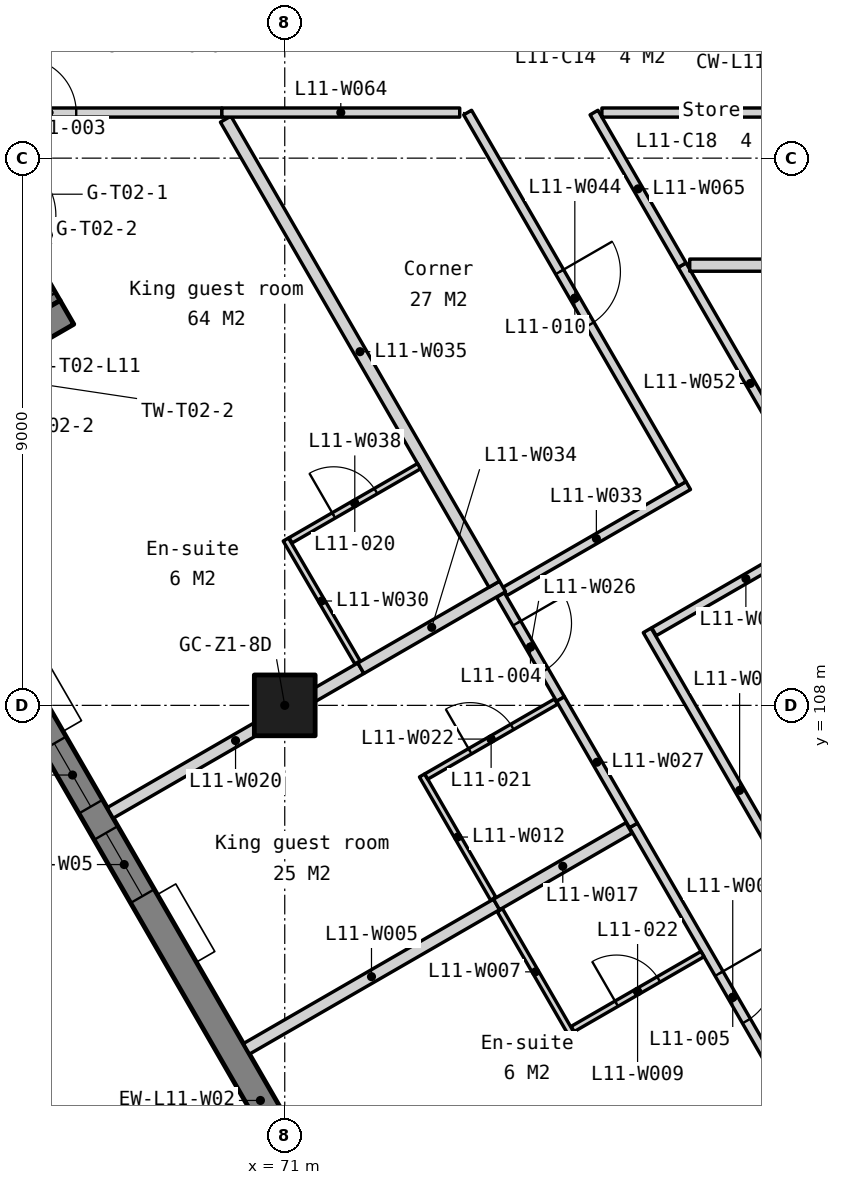
"""IFC4 building model, lengths in metres.
Left out: names, types, materials, properties, quantities, classifications, styles, units other than length and angle.
Written with IfcOpenShell. Run it as: python <this file> out.ifc"""

import sys

from ifc_helpers import new_model, si_unit, direction, frame, frame_2d, origin, origin_2d, place, context, subcontext, project, spatial, polyline, rectangle, outline, extrude, element, fill, save


model = new_model("IFC4")
c1 = context("Model", 3, precision=1e-05, world=origin(), true_north=direction((0.0, 1.0)))
c2 = subcontext(c1, "Body", "Model", "MODEL_VIEW")
j1 = project(units=[si_unit("LENGTHUNIT", "METRE"), si_unit("PLANEANGLEUNIT", "RADIAN")], contexts=[c1])
p1 = place(None, origin())
s1 = spatial("IfcSite", under=j1, at=p1, CompositionType="ELEMENT")
p2 = place(p1, origin())
s2 = spatial("IfcBuilding", under=s1, at=p2, CompositionType="ELEMENT")
p3 = place(p2, frame((0.0, 0.0, 52.5)))
s3 = spatial("IfcBuildingStorey", under=s2, at=p3, CompositionType="ELEMENT", Elevation=52.5)
p4 = place(p3, frame((71.0, 108.0, 0.0), z_axis=(0.0, 0.0, 1.0), x_axis=(1.0, 0.0, 0.0)))
e1 = element("IfcColumn", 1, at=p4, inside=s3, PredefinedType="COLUMN", context=c2, shape_type="SweptSolid", body=[
    extrude(rectangle(XDim=1.0, YDim=1.0, at=origin_2d()), origin(), (0.0, 0.0, 1.0), 3.5),
])
p5 = place(p3, frame((64.305, 112.405, -0.15), z_axis=(0.0, 0.0, 1.0), x_axis=(0.499997464327, -0.866026867751, 0.0)))
e2 = element("IfcWall", 2, at=p5, inside=s3, PredefinedType="SOLIDWALL", context=c2, shape_type="SweptSolid", body=[
    extrude(outline(polyline([(25.18, 3.5), (25.18, 0.0), (0.0, 0.0), (0.0, 3.5), (25.18, 3.5)])), frame((0.0, 0.225, 0.0), z_axis=(0.0, -1.0, 0.0), x_axis=(1.0, 0.0, 0.0)), (0.0, 0.0, 1.0), 0.45),
])
p6 = place(p5, frame((5.81, 0.0, 1.05)))
e3 = element("IfcOpeningElement", 3, at=p6, cuts=e2, PredefinedType="OPENING", context=c2, shape_type="SweptSolid", body=[
    extrude(rectangle(XDim=1.2, YDim=1.5, at=frame_2d((0.6, 0.75))), frame((0.0, 0.235, 0.0), z_axis=(0.0, -1.0, 0.0), x_axis=(1.0, 0.0, 0.0)), (0.0, 0.0, 1.0), 0.47),
])
p7 = place(p5, frame((7.51, 0.0, 1.05)))
e4 = element("IfcOpeningElement", 4, at=p7, cuts=e2, PredefinedType="OPENING", context=c2, shape_type="SweptSolid", body=[
    extrude(rectangle(XDim=1.2, YDim=1.5, at=frame_2d((0.6, 0.75))), frame((0.0, 0.235, 0.0), z_axis=(0.0, -1.0, 0.0), x_axis=(1.0, 0.0, 0.0)), (0.0, 0.0, 1.0), 0.47),
])
p8 = place(p5, frame((14.77, 0.0, 1.05)))
e5 = element("IfcOpeningElement", 5, at=p8, cuts=e2, PredefinedType="OPENING", context=c2, shape_type="SweptSolid", body=[
    extrude(rectangle(XDim=1.2, YDim=1.5, at=frame_2d((0.6, 0.75))), frame((0.0, 0.235, 0.0), z_axis=(0.0, -1.0, 0.0), x_axis=(1.0, 0.0, 0.0)), (0.0, 0.0, 1.0), 0.47),
])
p9 = place(p5, frame((16.47, 0.0, 1.05)))
e6 = element("IfcOpeningElement", 6, at=p9, cuts=e2, PredefinedType="OPENING", context=c2, shape_type="SweptSolid", body=[
    extrude(rectangle(XDim=1.2, YDim=1.5, at=frame_2d((0.6, 0.75))), frame((0.0, 0.235, 0.0), z_axis=(0.0, -1.0, 0.0), x_axis=(1.0, 0.0, 0.0)), (0.0, 0.0, 1.0), 0.47),
])
p10 = place(p5, frame((23.258, 0.0, 1.05)))
e7 = element("IfcOpeningElement", 7, at=p10, cuts=e2, PredefinedType="OPENING", context=c2, shape_type="SweptSolid", body=[
    extrude(rectangle(XDim=1.2, YDim=1.5, at=frame_2d((0.6, 0.75))), frame((0.0, 0.235, 0.0), z_axis=(0.0, -1.0, 0.0), x_axis=(1.0, 0.0, 0.0)), (0.0, 0.0, 1.0), 0.47),
])
p11 = place(p3, frame((63.998, 112.488, 0.0), z_axis=(0.0, 0.0, 1.0), x_axis=(0.866005453737, 0.500034552904, 0.0)))
e8 = element("IfcWall", 8, at=p11, inside=s3, PredefinedType="SOLIDWALL", context=c2, shape_type="SweptSolid", body=[
    extrude(rectangle(XDim=3.95, YDim=0.45, at=frame_2d((1.975, 0.0))), origin(), (0.0, 0.0, 1.0), 6.85),
])
p12 = place(p3, frame((65.861, 116.71, -0.15), z_axis=(0.0, 0.0, 1.0), x_axis=(0.499961950354, -0.866047370643, 0.0)))
e9 = element("IfcWall", 9, at=p12, inside=s3, PredefinedType="SOLIDWALL", context=c2, shape_type="SweptSolid", body=[
    extrude(rectangle(XDim=2.5, YDim=0.45, at=frame_2d((1.25, 0.0))), origin(), (0.0, 0.0, 1.0), 3.5),
])
p13 = place(p12, frame((0.75, 0.0, 0.15)))
e10 = element("IfcOpeningElement", 10, at=p13, cuts=e9, PredefinedType="OPENING", context=c2, shape_type="SweptSolid", body=[
    extrude(rectangle(XDim=1.0, YDim=2.4, at=frame_2d((0.5, 1.2))), frame((0.0, 0.235, 0.0), z_axis=(0.0, -1.0, 0.0), x_axis=(1.0, 0.0, 0.0)), (0.0, 0.0, 1.0), 0.47),
])
p14 = place(p12, frame((0.15, 0.0, 0.15)))
e11 = element("IfcOpeningElement", 11, at=p14, cuts=e9, PredefinedType="OPENING", context=c2, shape_type="SweptSolid", body=[
    extrude(rectangle(XDim=0.4, YDim=2.4, at=frame_2d((0.2, 1.2))), frame((0.0, 0.235, 0.0), z_axis=(0.0, -1.0, 0.0), x_axis=(1.0, 0.0, 0.0)), (0.0, 0.0, 1.0), 0.47),
])
p15 = place(p12, frame((1.95, 0.0, 0.15)))
e12 = element("IfcOpeningElement", 12, at=p15, cuts=e9, PredefinedType="OPENING", context=c2, shape_type="SweptSolid", body=[
    extrude(rectangle(XDim=0.4, YDim=2.4, at=frame_2d((0.2, 1.2))), frame((0.0, 0.235, 0.0), z_axis=(0.0, -1.0, 0.0), x_axis=(1.0, 0.0, 0.0)), (0.0, 0.0, 1.0), 0.47),
])
p16 = place(p3, frame((76.735, 106.026, 0.0), z_axis=(0.0, 0.0, 1.0), x_axis=(0.499995393218, -0.866028063495, 0.0)))
e13 = element("IfcWall", 13, at=p16, inside=s3, PredefinedType="PARTITIONING", context=c2, shape_type="SweptSolid", body=[
    extrude(rectangle(XDim=6.53, YDim=0.15, at=frame_2d((3.265, 0.0))), origin(), (0.0, 0.0, 1.0), 3.35),
])
p17 = place(p16, frame((2.815, 0.0, 0.0)))
e14 = element("IfcOpeningElement", 14, at=p17, cuts=e13, PredefinedType="OPENING", context=c2, shape_type="SweptSolid", body=[
    extrude(rectangle(XDim=0.9, YDim=2.1, at=frame_2d((0.45, 1.05))), frame((0.0, 0.085, 0.0), z_axis=(0.0, -1.0, 0.0), x_axis=(1.0, 0.0, 0.0)), (0.0, 0.0, 1.0), 0.17),
])
p18 = place(p3, frame((70.37, 102.351, 0.0), z_axis=(0.0, 0.0, 1.0), x_axis=(0.866033238375, 0.499986429846, 0.0)))
e15 = element("IfcWall", 15, at=p18, inside=s3, PredefinedType="PARTITIONING", context=c2, shape_type="SweptSolid", body=[
    extrude(rectangle(XDim=4.75, YDim=0.2, at=frame_2d((2.375, 0.0))), origin(), (0.0, 0.0, 1.0), 3.35),
])
p19 = place(p3, frame((74.538, 104.63, 0.0), z_axis=(0.0, 0.0, 1.0), x_axis=(0.499999433879, -0.866025730634, 0.0)))
e16 = element("IfcWall", 16, at=p19, inside=s3, PredefinedType="PARTITIONING", context=c2, shape_type="SweptSolid", body=[
    extrude(rectangle(XDim=2.34, YDim=0.1, at=frame_2d((1.17, 0.0))), origin(), (0.0, 0.0, 1.0), 3.35),
])
p20 = place(p3, frame((75.735, 102.677, 0.0), z_axis=(0.0, 0.0, 1.0), x_axis=(0.866040446274, 0.499973944738, 0.0)))
e17 = element("IfcWall", 17, at=p20, inside=s3, PredefinedType="PARTITIONING", context=c2, shape_type="SweptSolid", body=[
    extrude(rectangle(XDim=2.465, YDim=0.1, at=frame_2d((1.232, 0.0))), origin(), (0.0, 0.0, 1.0), 3.35),
])
p21 = place(p20, frame((0.833, 0.0, 0.0)))
e18 = element("IfcOpeningElement", 18, at=p21, cuts=e17, PredefinedType="OPENING", context=c2, shape_type="SweptSolid", body=[
    extrude(rectangle(XDim=0.8, YDim=2.1, at=frame_2d((0.4, 1.05))), frame((0.0, 0.06, 0.0), z_axis=(0.0, -1.0, 0.0), x_axis=(1.0, 0.0, 0.0)), (0.0, 0.0, 1.0), 0.12),
])
p22 = place(p3, frame((73.258, 106.847, 0.0), z_axis=(0.0, 0.0, 1.0), x_axis=(0.499999433879, -0.866025730634, 0.0)))
e19 = element("IfcWall", 19, at=p22, inside=s3, PredefinedType="PARTITIONING", context=c2, shape_type="SweptSolid", body=[
    extrude(rectangle(XDim=2.34, YDim=0.1, at=frame_2d((1.17, 0.0))), origin(), (0.0, 0.0, 1.0), 3.35),
])
p23 = place(p3, frame((74.483, 104.726, 0.0), z_axis=(0.0, 0.0, 1.0), x_axis=(0.866006140796, 0.500033362991, 0.0)))
e20 = element("IfcWall", 20, at=p23, inside=s3, PredefinedType="PARTITIONING", context=c2, shape_type="SweptSolid", body=[
    extrude(rectangle(XDim=2.515, YDim=0.2, at=frame_2d((1.257, 0.0))), origin(), (0.0, 0.0, 1.0), 3.35),
])
p24 = place(p3, frame((68.13, 106.23, 0.0), z_axis=(0.0, 0.0, 1.0), x_axis=(0.866037825118, 0.499978485002, 0.0)))
e21 = element("IfcWall", 21, at=p24, inside=s3, PredefinedType="PARTITIONING", context=c2, shape_type="SweptSolid", body=[
    extrude(rectangle(XDim=4.76, YDim=0.2, at=frame_2d((2.38, 0.0))), origin(), (0.0, 0.0, 1.0), 3.35),
])
p25 = place(p3, frame((73.327, 106.829, 0.0), z_axis=(0.0, 0.0, 1.0), x_axis=(0.866040446274, 0.499973944738, 0.0)))
e22 = element("IfcWall", 22, at=p25, inside=s3, PredefinedType="PARTITIONING", context=c2, shape_type="SweptSolid", body=[
    extrude(rectangle(XDim=2.465, YDim=0.1, at=frame_2d((1.232, 0.0))), origin(), (0.0, 0.0, 1.0), 3.35),
])
p26 = place(p25, frame((0.833, 0.0, 0.0)))
e23 = element("IfcOpeningElement", 23, at=p26, cuts=e22, PredefinedType="OPENING", context=c2, shape_type="SweptSolid", body=[
    extrude(rectangle(XDim=0.8, YDim=2.1, at=frame_2d((0.4, 1.05))), frame((0.0, 0.06, 0.0), z_axis=(0.0, -1.0, 0.0), x_axis=(1.0, 0.0, 0.0)), (0.0, 0.0, 1.0), 0.12),
])
p27 = place(p3, frame((74.548, 109.814, 0.0), z_axis=(0.0, 0.0, 1.0), x_axis=(0.499968599967, -0.866043531843, 0.0)))
e24 = element("IfcWall", 24, at=p27, inside=s3, PredefinedType="PARTITIONING", context=c2, shape_type="SweptSolid", body=[
    extrude(rectangle(XDim=1.975, YDim=0.15, at=frame_2d((0.987, 0.0))), origin(), (0.0, 0.0, 1.0), 3.35),
])
p28 = place(p27, frame((0.538, 0.0, 0.0)))
e25 = element("IfcOpeningElement", 25, at=p28, cuts=e24, PredefinedType="OPENING", context=c2, shape_type="SweptSolid", body=[
    extrude(rectangle(XDim=0.9, YDim=2.1, at=frame_2d((0.45, 1.05))), frame((0.0, 0.085, 0.0), z_axis=(0.0, -1.0, 0.0), x_axis=(1.0, 0.0, 0.0)), (0.0, 0.0, 1.0), 0.17),
])
p29 = place(p3, frame((75.535, 108.104, 0.0), z_axis=(0.0, 0.0, 1.0), x_axis=(0.500033551112, -0.866006032174, 0.0)))
e26 = element("IfcWall", 26, at=p29, inside=s3, PredefinedType="PARTITIONING", context=c2, shape_type="SweptSolid", body=[
    extrude(rectangle(XDim=2.4, YDim=0.15, at=frame_2d((1.2, 0.0))), origin(), (0.0, 0.0, 1.0), 3.35),
])
p30 = place(p3, frame((71.018, 110.727, 0.0), z_axis=(0.0, 0.0, 1.0), x_axis=(0.503637463939, -0.863915102841, 0.0)))
e27 = element("IfcWall", 27, at=p30, inside=s3, PredefinedType="PARTITIONING", context=c2, shape_type="SweptSolid", body=[
    extrude(rectangle(XDim=2.34, YDim=0.1, at=frame_2d((1.17, 0.0))), origin(), (0.0, 0.0, 1.0), 3.35),
])
p31 = place(p3, frame((76.961, 109.234, 0.0), z_axis=(0.0, 0.0, 1.0), x_axis=(0.499984420002, -0.866034398714, 0.0)))
e28 = element("IfcWall", 28, at=p31, inside=s3, PredefinedType="PARTITIONING", context=c2, shape_type="SweptSolid", body=[
    extrude(rectangle(XDim=6.077, YDim=0.15, at=frame_2d((3.039, 0.0))), origin(), (0.0, 0.0, 1.0), 3.35),
])
p32 = place(p3, frame((74.614, 109.87, 0.0), z_axis=(0.0, 0.0, 1.0), x_axis=(0.866043466982, 0.49996871232, 0.0)))
e29 = element("IfcWall", 29, at=p32, inside=s3, PredefinedType="PARTITIONING", context=c2, shape_type="SweptSolid", body=[
    extrude(rectangle(XDim=3.49, YDim=0.15, at=frame_2d((1.745, 0.0))), origin(), (0.0, 0.0, 1.0), 3.35),
])
p33 = place(p3, frame((72.252, 108.61, 0.0), z_axis=(0.0, 0.0, 1.0), x_axis=(0.865989100438, 0.500062873969, 0.0)))
e30 = element("IfcWall", 30, at=p33, inside=s3, PredefinedType="PARTITIONING", context=c2, shape_type="SweptSolid", body=[
    extrude(rectangle(XDim=2.69, YDim=0.2, at=frame_2d((1.345, 0.0))), origin(), (0.0, 0.0, 1.0), 3.35),
])
p34 = place(p3, frame((70.029, 117.642, 0.0), z_axis=(0.0, 0.0, 1.0), x_axis=(0.499997595687, -0.866026791911, 0.0)))
e31 = element("IfcWall", 31, at=p34, inside=s3, PredefinedType="PARTITIONING", context=c2, shape_type="SweptSolid", body=[
    extrude(rectangle(XDim=8.833, YDim=0.2, at=frame_2d((4.417, 0.0))), origin(), (0.0, 0.0, 1.0), 3.35),
])
p35 = place(p3, frame((71.095, 110.714, 0.0), z_axis=(0.0, 0.0, 1.0), x_axis=(0.866048967903, 0.499959183527, 0.0)))
e32 = element("IfcWall", 32, at=p35, inside=s3, PredefinedType="PARTITIONING", context=c2, shape_type="SweptSolid", body=[
    extrude(rectangle(XDim=2.44, YDim=0.1, at=frame_2d((1.22, 0.0))), origin(), (0.0, 0.0, 1.0), 3.35),
])
p36 = place(p35, frame((0.82, 0.0, 0.0)))
e33 = element("IfcOpeningElement", 33, at=p36, cuts=e32, PredefinedType="OPENING", context=c2, shape_type="SweptSolid", body=[
    extrude(rectangle(XDim=0.8, YDim=2.1, at=frame_2d((0.4, 1.05))), frame((0.0, 0.06, 0.0), z_axis=(0.0, -1.0, 0.0), x_axis=(1.0, 0.0, 0.0)), (0.0, 0.0, 1.0), 0.12),
])
p37 = place(p3, frame((77.073, 109.211, 0.0), z_axis=(0.0, 0.0, 1.0), x_axis=(0.866013176292, 0.50002117804, 0.0)))
e34 = element("IfcWall", 34, at=p37, inside=s3, PredefinedType="PARTITIONING", context=c2, shape_type="SweptSolid", body=[
    extrude(rectangle(XDim=3.49, YDim=0.15, at=frame_2d((1.745, 0.0))), origin(), (0.0, 0.0, 1.0), 3.35),
])
p38 = place(p3, frame((74.007, 117.75, 0.0), z_axis=(0.0, 0.0, 1.0), x_axis=(0.500026110575, -0.866010328312, 0.0)))
e35 = element("IfcWall", 35, at=p38, inside=s3, PredefinedType="PARTITIONING", context=c2, shape_type="SweptSolid", body=[
    extrude(rectangle(XDim=7.052, YDim=0.15, at=frame_2d((3.526, 0.0))), origin(), (0.0, 0.0, 1.0), 3.35),
])
p39 = place(p38, frame((3.026, 0.0, 0.0)))
e36 = element("IfcOpeningElement", 36, at=p39, cuts=e35, PredefinedType="OPENING", context=c2, shape_type="SweptSolid", body=[
    extrude(rectangle(XDim=1.0, YDim=2.1, at=frame_2d((0.5, 1.05))), frame((0.0, 0.085, 0.0), z_axis=(0.0, -1.0, 0.0), x_axis=(1.0, 0.0, 0.0)), (0.0, 0.0, 1.0), 0.17),
])
p40 = place(p3, frame((77.535, 115.24, 0.0), z_axis=(0.0, 0.0, 1.0), x_axis=(0.500043949999, -0.866000027754, 0.0)))
e37 = element("IfcWall", 37, at=p40, inside=s3, PredefinedType="PARTITIONING", context=c2, shape_type="SweptSolid", body=[
    extrude(rectangle(XDim=4.492, YDim=0.15, at=frame_2d((2.246, 0.0))), origin(), (0.0, 0.0, 1.0), 3.35),
])
p41 = place(p3, frame((77.66, 115.24, 0.0), z_axis=(0.0, 0.0, 1.0), x_axis=(1.0, 0.0, 0.0)))
e38 = element("IfcWall", 38, at=p41, inside=s3, PredefinedType="PARTITIONING", context=c2, shape_type="SweptSolid", body=[
    extrude(rectangle(XDim=8.721, YDim=0.2, at=frame_2d((4.361, 0.0))), origin(), (0.0, 0.0, 1.0), 3.35),
])
p42 = place(p3, frame((64.275, 117.75, 0.0), z_axis=(0.0, 0.0, 1.0), x_axis=(1.0, 0.0, 0.0)))
e39 = element("IfcWall", 39, at=p42, inside=s3, PredefinedType="PARTITIONING", context=c2, shape_type="SweptSolid", body=[
    extrude(rectangle(XDim=5.691, YDim=0.15, at=frame_2d((2.846, 0.0))), origin(), (0.0, 0.0, 1.0), 2.938),
])
p43 = place(p42, frame((2.396, 0.0, 0.0)))
e40 = element("IfcOpeningElement", 40, at=p43, cuts=e39, PredefinedType="OPENING", context=c2, shape_type="SweptSolid", body=[
    extrude(rectangle(XDim=0.9, YDim=2.1, at=frame_2d((0.45, 1.05))), frame((0.0, 0.085, 0.0), z_axis=(0.0, -1.0, 0.0), x_axis=(1.0, 0.0, 0.0)), (0.0, 0.0, 1.0), 0.17),
])
p44 = place(p3, frame((69.966, 117.75, 0.0), z_axis=(0.0, 0.0, 1.0), x_axis=(1.0, 0.0, 0.0)))
e41 = element("IfcWall", 41, at=p44, inside=s3, PredefinedType="PARTITIONING", context=c2, shape_type="SweptSolid", body=[
    extrude(rectangle(XDim=3.911, YDim=0.15, at=frame_2d((1.956, 0.0))), origin(), (0.0, 0.0, 1.0), 2.938),
])
p45 = place(p3, frame((76.086, 117.75, 0.0), z_axis=(0.0, 0.0, 1.0), x_axis=(0.499953366038, -0.866052326241, 0.0)))
e42 = element("IfcWall", 42, at=p45, inside=s3, PredefinedType="PARTITIONING", context=c2, shape_type="SweptSolid", body=[
    extrude(rectangle(XDim=2.898, YDim=0.15, at=frame_2d((1.449, 0.0))), origin(), (0.0, 0.0, 1.0), 3.35),
])
p46 = place(p3, frame((76.216, 117.75, 0.0), z_axis=(0.0, 0.0, 1.0), x_axis=(1.0, 0.0, 0.0)))
e43 = element("IfcWall", 43, at=p46, inside=s3, PredefinedType="PARTITIONING", context=c2, shape_type="SweptSolid", body=[
    extrude(rectangle(XDim=11.61, YDim=0.15, at=frame_2d((5.805, 0.0))), origin(), (0.0, 0.0, 1.0), 2.938),
])
p47 = place(p46, frame((5.355, 0.0, 0.0)))
e44 = element("IfcOpeningElement", 44, at=p47, cuts=e43, PredefinedType="OPENING", context=c2, shape_type="SweptSolid", body=[
    extrude(rectangle(XDim=0.9, YDim=2.1, at=frame_2d((0.45, 1.05))), frame((0.0, 0.085, 0.0), z_axis=(0.0, -1.0, 0.0), x_axis=(1.0, 0.0, 0.0)), (0.0, 0.0, 1.0), 0.17),
])
p48 = place(p6, origin())
e45 = element("IfcWindow", 45, at=p48, inside=s3, PartitioningType="SINGLE_PANEL", PredefinedType="WINDOW", context=c2, shape_type="SweptSolid", body=[
    extrude(rectangle(XDim=1.2, YDim=1.5, at=frame_2d((0.6, 0.75))), frame((0.0, 0.03, 0.0), z_axis=(0.0, -1.0, 0.0), x_axis=(1.0, 0.0, 0.0)), (0.0, 0.0, 1.0), 0.06),
])
fill(e3, e45)
p49 = place(p7, origin())
e46 = element("IfcWindow", 46, at=p49, inside=s3, PartitioningType="SINGLE_PANEL", PredefinedType="WINDOW", context=c2, shape_type="SweptSolid", body=[
    extrude(rectangle(XDim=1.2, YDim=1.5, at=frame_2d((0.6, 0.75))), frame((0.0, 0.03, 0.0), z_axis=(0.0, -1.0, 0.0), x_axis=(1.0, 0.0, 0.0)), (0.0, 0.0, 1.0), 0.06),
])
fill(e4, e46)
p50 = place(p43, origin())
e47 = element("IfcDoor", 47, at=p50, inside=s3, OperationType="SINGLE_SWING_LEFT", PredefinedType="DOOR", context=c2, shape_type="SweptSolid", body=[
    extrude(rectangle(XDim=0.9, YDim=2.1, at=frame_2d((0.45, 1.05))), frame((0.0, 0.025, 0.0), z_axis=(0.0, -1.0, 0.0), x_axis=(1.0, 0.0, 0.0)), (0.0, 0.0, 1.0), 0.05),
])
fill(e40, e47)
p51 = place(p28, origin())
e48 = element("IfcDoor", 48, at=p51, inside=s3, OperationType="SINGLE_SWING_LEFT", PredefinedType="DOOR", context=c2, shape_type="SweptSolid", body=[
    extrude(rectangle(XDim=0.9, YDim=2.1, at=frame_2d((0.45, 1.05))), frame((0.0, 0.025, 0.0), z_axis=(0.0, -1.0, 0.0), x_axis=(1.0, 0.0, 0.0)), (0.0, 0.0, 1.0), 0.05),
])
fill(e25, e48)
p52 = place(p17, origin())
e49 = element("IfcDoor", 49, at=p52, inside=s3, OperationType="SINGLE_SWING_LEFT", PredefinedType="DOOR", context=c2, shape_type="SweptSolid", body=[
    extrude(rectangle(XDim=0.9, YDim=2.1, at=frame_2d((0.45, 1.05))), frame((0.0, 0.025, 0.0), z_axis=(0.0, -1.0, 0.0), x_axis=(1.0, 0.0, 0.0)), (0.0, 0.0, 1.0), 0.05),
])
fill(e14, e49)
p53 = place(p39, origin())
e50 = element("IfcDoor", 50, at=p53, inside=s3, OperationType="SINGLE_SWING_LEFT", PredefinedType="DOOR", context=c2, shape_type="SweptSolid", body=[
    extrude(rectangle(XDim=1.0, YDim=2.1, at=frame_2d((0.5, 1.05))), frame((0.0, 0.025, 0.0), z_axis=(0.0, -1.0, 0.0), x_axis=(1.0, 0.0, 0.0)), (0.0, 0.0, 1.0), 0.05),
])
fill(e36, e50)
p54 = place(p36, origin())
e51 = element("IfcDoor", 51, at=p54, inside=s3, OperationType="SINGLE_SWING_LEFT", PredefinedType="DOOR", context=c2, shape_type="SweptSolid", body=[
    extrude(rectangle(XDim=0.8, YDim=2.1, at=frame_2d((0.4, 1.05))), frame((0.0, 0.025, 0.0), z_axis=(0.0, -1.0, 0.0), x_axis=(1.0, 0.0, 0.0)), (0.0, 0.0, 1.0), 0.05),
])
fill(e33, e51)
p55 = place(p26, origin())
e52 = element("IfcDoor", 52, at=p55, inside=s3, OperationType="SINGLE_SWING_LEFT", PredefinedType="DOOR", context=c2, shape_type="SweptSolid", body=[
    extrude(rectangle(XDim=0.8, YDim=2.1, at=frame_2d((0.4, 1.05))), frame((0.0, 0.025, 0.0), z_axis=(0.0, -1.0, 0.0), x_axis=(1.0, 0.0, 0.0)), (0.0, 0.0, 1.0), 0.05),
])
fill(e23, e52)
p56 = place(p21, origin())
e53 = element("IfcDoor", 53, at=p56, inside=s3, OperationType="SINGLE_SWING_LEFT", PredefinedType="DOOR", context=c2, shape_type="SweptSolid", body=[
    extrude(rectangle(XDim=0.8, YDim=2.1, at=frame_2d((0.4, 1.05))), frame((0.0, 0.025, 0.0), z_axis=(0.0, -1.0, 0.0), x_axis=(1.0, 0.0, 0.0)), (0.0, 0.0, 1.0), 0.05),
])
fill(e18, e53)
save(model, sys.argv[1])
